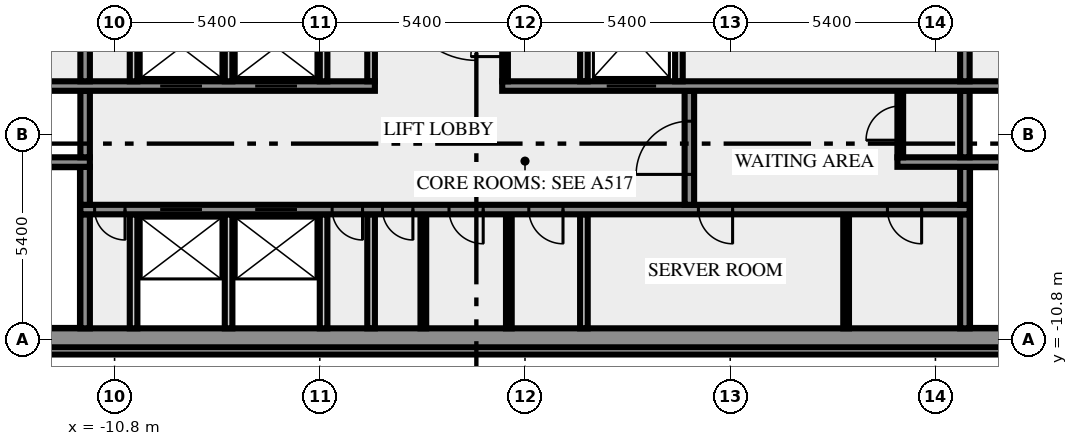
"""IFC4 building model, lengths in metres.
Left out: names, types, materials, properties, quantities, classifications, styles, units other than length and angle.
Written with IfcOpenShell. Run it as: python <this file> out.ifc"""

import sys

from ifc_helpers import new_model, si_unit, direction, frame, frame_2d, origin, place, context, subcontext, project, spatial, rectangle, extrude, element, fill, save


model = new_model("IFC4")
c1 = context("Model", 3, precision=1e-05, world=origin(), true_north=direction((0.0, 1.0)))
c2 = subcontext(c1, "Body", "Model", "MODEL_VIEW")
j1 = project(units=[si_unit("LENGTHUNIT", "METRE"), si_unit("PLANEANGLEUNIT", "RADIAN")], contexts=[c1])
p1 = place(None, origin())
s1 = spatial("IfcSite", under=j1, at=p1, CompositionType="ELEMENT")
p2 = place(p1, origin())
s2 = spatial("IfcBuilding", under=s1, at=p2, CompositionType="ELEMENT")
p3 = place(p2, frame((0.0, 0.0, 307.0)))
s3 = spatial("IfcBuildingStorey", under=s2, at=p3, CompositionType="ELEMENT", Elevation=307.0)
p4 = place(p3, frame((-17.444, -11.088, 0.0), z_axis=(0.0, 0.0, 1.0), x_axis=(1.0, 0.0, 0.0)))
e1 = element("IfcWall", 1, at=p4, inside=s3, PredefinedType="SOLIDWALL", context=c2, shape_type="SweptSolid", body=[
    extrude(rectangle(XDim=34.888, YDim=0.2, at=frame_2d((17.444, 0.0))), origin(), (0.0, 0.0, 1.0), 3.65),
])
p5 = place(p3, frame((-20.0, -10.75, 0.0), z_axis=(0.0, 0.0, 1.0), x_axis=(1.0, 0.0, 0.0)))
e2 = element("IfcWall", 2, at=p5, inside=s3, PredefinedType="SHEAR", context=c2, shape_type="SweptSolid", body=[
    extrude(rectangle(XDim=40.0, YDim=0.5, at=frame_2d((20.0, 0.0))), origin(), (0.0, 0.0, 1.0), 3.65),
])
p6 = place(p5, frame((0.8, 0.0, 1.0)))
e3 = element("IfcOpeningElement", 3, at=p6, cuts=e2, PredefinedType="OPENING", context=c2, shape_type="SweptSolid", body=[
    extrude(rectangle(XDim=1.2, YDim=1.2, at=frame_2d((0.6, 0.6))), frame((0.0, 0.26, 0.0), z_axis=(0.0, -1.0, 0.0), x_axis=(1.0, 0.0, 0.0)), (0.0, 0.0, 1.0), 0.52),
])
p7 = place(p5, frame((38.0, 0.0, 1.0)))
e4 = element("IfcOpeningElement", 4, at=p7, cuts=e2, PredefinedType="OPENING", context=c2, shape_type="SweptSolid", body=[
    extrude(rectangle(XDim=1.2, YDim=1.2, at=frame_2d((0.6, 0.6))), frame((0.0, 0.26, 0.0), z_axis=(0.0, -1.0, 0.0), x_axis=(1.0, 0.0, 0.0)), (0.0, 0.0, 1.0), 0.52),
])
p8 = place(p3, frame((-11.575, -10.5, 0.0), z_axis=(0.0, 0.0, 1.0), x_axis=(0.0, 1.0, 0.0)))
e5 = element("IfcWall", 5, at=p8, inside=s3, PredefinedType="SHEAR", context=c2, shape_type="SweptSolid", body=[
    extrude(rectangle(XDim=3.0, YDim=0.25, at=frame_2d((1.5, 0.0))), origin(), (0.0, 0.0, 1.0), 3.65),
])
for number, where, z_axis, x_axis in (
    (6, (-10.3, -10.5, 0.0), (0.0, 0.0, 1.0), (0.0, 1.0, 0.0)),
    (7, (-7.8, -10.5, 0.0), (0.0, 0.0, 1.0), (0.0, 1.0, 0.0)),
    (8, (-5.3, -10.5, 0.0), (0.0, 0.0, 1.0), (0.0, 1.0, 0.0)),
    (9, (-4.05, -10.5, 0.0), (0.0, 0.0, 1.0), (0.0, 1.0, 0.0)),
):
    element("IfcWall", number, at=place(p3, frame(where, z_axis=z_axis, x_axis=x_axis)), inside=s3, PredefinedType="SOLIDWALL", context=c2, shape_type="SweptSolid", body=[
        extrude(rectangle(XDim=3.0, YDim=0.2, at=frame_2d((1.5, 0.0))), origin(), (0.0, 0.0, 1.0), 3.65),
    ])
for number, where, z_axis, x_axis in (
    (10, (-2.675, -10.5, 0.0), (0.0, 0.0, 1.0), (0.0, 1.0, 0.0)),
    (11, (-0.425, -10.5, 0.0), (0.0, 0.0, 1.0), (0.0, 1.0, 0.0)),
):
    element("IfcWall", number, at=place(p3, frame(where, z_axis=z_axis, x_axis=x_axis)), inside=s3, PredefinedType="PARTITIONING", context=c2, shape_type="SweptSolid", body=[
        extrude(rectangle(XDim=3.0, YDim=0.15, at=frame_2d((1.5, 0.0))), origin(), (0.0, 0.0, 1.0), 3.65),
    ])
p9 = place(p3, frame((1.55, -10.5, 0.0), z_axis=(0.0, 0.0, 1.0), x_axis=(0.0, 1.0, 0.0)))
e12 = element("IfcWall", 12, at=p9, inside=s3, PredefinedType="SOLIDWALL", context=c2, shape_type="SweptSolid", body=[
    extrude(rectangle(XDim=3.0, YDim=0.2, at=frame_2d((1.5, 0.0))), origin(), (0.0, 0.0, 1.0), 3.65),
])
p10 = place(p3, frame((8.45, -10.5, 0.0), z_axis=(0.0, 0.0, 1.0), x_axis=(0.0, 1.0, 0.0)))
e13 = element("IfcWall", 13, at=p10, inside=s3, PredefinedType="PARTITIONING", context=c2, shape_type="SweptSolid", body=[
    extrude(rectangle(XDim=3.0, YDim=0.15, at=frame_2d((1.5, 0.0))), origin(), (0.0, 0.0, 1.0), 3.65),
])
p11 = place(p3, frame((11.575, -10.5, 0.0), z_axis=(0.0, 0.0, 1.0), x_axis=(0.0, 1.0, 0.0)))
e14 = element("IfcWall", 14, at=p11, inside=s3, PredefinedType="SHEAR", context=c2, shape_type="SweptSolid", body=[
    extrude(rectangle(XDim=3.0, YDim=0.25, at=frame_2d((1.5, 0.0))), origin(), (0.0, 0.0, 1.0), 3.65),
])
p12 = place(p3, frame((11.7, -7.375, 0.0), z_axis=(0.0, 0.0, 1.0), x_axis=(-1.0, 0.0, 0.0)))
e15 = element("IfcWall", 15, at=p12, inside=s3, PredefinedType="SHEAR", context=c2, shape_type="SweptSolid", body=[
    extrude(rectangle(XDim=23.4, YDim=0.25, at=frame_2d((11.7, 0.0))), origin(), (0.0, 0.0, 1.0), 3.65),
])
p13 = place(p12, frame((22.225, 0.0, 0.0)))
e16 = element("IfcOpeningElement", 16, at=p13, cuts=e15, PredefinedType="OPENING", context=c2, shape_type="SweptSolid", body=[
    extrude(rectangle(XDim=0.8, YDim=2.1, at=frame_2d((0.4, 1.05))), frame((0.0, 0.135, 0.0), z_axis=(0.0, -1.0, 0.0), x_axis=(1.0, 0.0, 0.0)), (0.0, 0.0, 1.0), 0.27),
])
p14 = place(p12, frame((20.2, 0.0, 0.0)))
e17 = element("IfcOpeningElement", 17, at=p14, cuts=e15, PredefinedType="OPENING", context=c2, shape_type="SweptSolid", body=[
    extrude(rectangle(XDim=1.1, YDim=2.1, at=frame_2d((0.55, 1.05))), frame((0.0, 0.135, 0.0), z_axis=(0.0, -1.0, 0.0), x_axis=(1.0, 0.0, 0.0)), (0.0, 0.0, 1.0), 0.27),
])
p15 = place(p12, frame((17.7, 0.0, 0.0)))
e18 = element("IfcOpeningElement", 18, at=p15, cuts=e15, PredefinedType="OPENING", context=c2, shape_type="SweptSolid", body=[
    extrude(rectangle(XDim=1.1, YDim=2.1, at=frame_2d((0.55, 1.05))), frame((0.0, 0.135, 0.0), z_axis=(0.0, -1.0, 0.0), x_axis=(1.0, 0.0, 0.0)), (0.0, 0.0, 1.0), 0.27),
])
p16 = place(p12, frame((15.975, 0.0, 0.0)))
e19 = element("IfcOpeningElement", 19, at=p16, cuts=e15, PredefinedType="OPENING", context=c2, shape_type="SweptSolid", body=[
    extrude(rectangle(XDim=0.8, YDim=2.1, at=frame_2d((0.4, 1.05))), frame((0.0, 0.135, 0.0), z_axis=(0.0, -1.0, 0.0), x_axis=(1.0, 0.0, 0.0)), (0.0, 0.0, 1.0), 0.27),
])
p17 = place(p12, frame((14.65, 0.0, 0.0)))
e20 = element("IfcOpeningElement", 20, at=p17, cuts=e15, PredefinedType="OPENING", context=c2, shape_type="SweptSolid", body=[
    extrude(rectangle(XDim=0.8, YDim=2.1, at=frame_2d((0.4, 1.05))), frame((0.0, 0.135, 0.0), z_axis=(0.0, -1.0, 0.0), x_axis=(1.0, 0.0, 0.0)), (0.0, 0.0, 1.0), 0.27),
])
p18 = place(p12, frame((12.8, 0.0, 0.0)))
e21 = element("IfcOpeningElement", 21, at=p18, cuts=e15, PredefinedType="OPENING", context=c2, shape_type="SweptSolid", body=[
    extrude(rectangle(XDim=0.9, YDim=2.1, at=frame_2d((0.45, 1.05))), frame((0.0, 0.135, 0.0), z_axis=(0.0, -1.0, 0.0), x_axis=(1.0, 0.0, 0.0)), (0.0, 0.0, 1.0), 0.27),
])
p19 = place(p12, frame((10.7, 0.0, 0.0)))
e22 = element("IfcOpeningElement", 22, at=p19, cuts=e15, PredefinedType="OPENING", context=c2, shape_type="SweptSolid", body=[
    extrude(rectangle(XDim=0.9, YDim=2.1, at=frame_2d((0.45, 1.05))), frame((0.0, 0.135, 0.0), z_axis=(0.0, -1.0, 0.0), x_axis=(1.0, 0.0, 0.0)), (0.0, 0.0, 1.0), 0.27),
])
p20 = place(p12, frame((6.237, 0.0, 0.0)))
e23 = element("IfcOpeningElement", 23, at=p20, cuts=e15, PredefinedType="OPENING", context=c2, shape_type="SweptSolid", body=[
    extrude(rectangle(XDim=0.9, YDim=2.1, at=frame_2d((0.45, 1.05))), frame((0.0, 0.135, 0.0), z_axis=(0.0, -1.0, 0.0), x_axis=(1.0, 0.0, 0.0)), (0.0, 0.0, 1.0), 0.27),
])
p21 = place(p12, frame((1.263, 0.0, 0.0)))
e24 = element("IfcOpeningElement", 24, at=p21, cuts=e15, PredefinedType="OPENING", context=c2, shape_type="SweptSolid", body=[
    extrude(rectangle(XDim=0.9, YDim=2.1, at=frame_2d((0.45, 1.05))), frame((0.0, 0.135, 0.0), z_axis=(0.0, -1.0, 0.0), x_axis=(1.0, 0.0, 0.0)), (0.0, 0.0, 1.0), 0.27),
])
p22 = place(p3, frame((-11.575, -7.25, 0.0), z_axis=(0.0, 0.0, 1.0), x_axis=(0.0, 1.0, 0.0)))
e25 = element("IfcWall", 25, at=p22, inside=s3, PredefinedType="SHEAR", context=c2, shape_type="SweptSolid", body=[
    extrude(rectangle(XDim=1.0, YDim=0.25, at=frame_2d((0.5, 0.0))), origin(), (0.0, 0.0, 1.0), 3.65),
])
p23 = place(p3, frame((4.325, -7.25, 0.0), z_axis=(0.0, 0.0, 1.0), x_axis=(0.0, 1.0, 0.0)))
e26 = element("IfcWall", 26, at=p23, inside=s3, PredefinedType="SHEAR", context=c2, shape_type="SweptSolid", body=[
    extrude(rectangle(XDim=3.0, YDim=0.25, at=frame_2d((1.5, 0.0))), origin(), (0.0, 0.0, 1.0), 3.65),
])
p24 = place(p23, frame((0.8, 0.0, 0.0)))
e27 = element("IfcOpeningElement", 27, at=p24, cuts=e26, PredefinedType="OPENING", context=c2, shape_type="SweptSolid", body=[
    extrude(rectangle(XDim=1.4, YDim=2.1, at=frame_2d((0.7, 1.05))), frame((0.0, 0.135, 0.0), z_axis=(0.0, -1.0, 0.0), x_axis=(1.0, 0.0, 0.0)), (0.0, 0.0, 1.0), 0.27),
])
p25 = place(p3, frame((11.575, -7.25, 0.0), z_axis=(0.0, 0.0, 1.0), x_axis=(0.0, 1.0, 0.0)))
e28 = element("IfcWall", 28, at=p25, inside=s3, PredefinedType="SHEAR", context=c2, shape_type="SweptSolid", body=[
    extrude(rectangle(XDim=1.0, YDim=0.25, at=frame_2d((0.5, 0.0))), origin(), (0.0, 0.0, 1.0), 3.65),
])
p26 = place(p3, frame((-11.45, -6.125, 0.0), z_axis=(0.0, 0.0, 1.0), x_axis=(-1.0, 0.0, 0.0)))
e29 = element("IfcWall", 29, at=p26, inside=s3, PredefinedType="SHEAR", context=c2, shape_type="SweptSolid", body=[
    extrude(rectangle(XDim=8.05, YDim=0.25, at=frame_2d((4.025, 0.0))), origin(), (0.0, 0.0, 1.0), 3.65),
])
p27 = place(p26, frame((6.2, 0.0, 0.0)))
e30 = element("IfcOpeningElement", 30, at=p27, cuts=e29, PredefinedType="OPENING", context=c2, shape_type="SweptSolid", body=[
    extrude(rectangle(XDim=1.8, YDim=2.1, at=frame_2d((0.9, 1.05))), frame((0.0, 0.135, 0.0), z_axis=(0.0, -1.0, 0.0), x_axis=(1.0, 0.0, 0.0)), (0.0, 0.0, 1.0), 0.27),
])
p28 = place(p3, frame((20.0, -6.125, 0.0), z_axis=(0.0, 0.0, 1.0), x_axis=(-1.0, 0.0, 0.0)))
e31 = element("IfcWall", 31, at=p28, inside=s3, PredefinedType="SHEAR", context=c2, shape_type="SweptSolid", body=[
    extrude(rectangle(XDim=10.2, YDim=0.25, at=frame_2d((5.1, 0.0))), origin(), (0.0, 0.0, 1.0), 3.65),
])
p29 = place(p28, frame((0.55, 0.0, 0.0)))
e32 = element("IfcOpeningElement", 32, at=p29, cuts=e31, PredefinedType="OPENING", context=c2, shape_type="SweptSolid", body=[
    extrude(rectangle(XDim=1.8, YDim=2.1, at=frame_2d((0.9, 1.05))), frame((0.0, 0.135, 0.0), z_axis=(0.0, -1.0, 0.0), x_axis=(1.0, 0.0, 0.0)), (0.0, 0.0, 1.0), 0.27),
])
p30 = place(p3, frame((-11.575, -6.0, 0.0), z_axis=(0.0, 0.0, 1.0), x_axis=(0.0, 1.0, 0.0)))
e33 = element("IfcWall", 33, at=p30, inside=s3, PredefinedType="SHEAR", context=c2, shape_type="SweptSolid", body=[
    extrude(rectangle(XDim=1.75, YDim=0.25, at=frame_2d((0.875, 0.0))), origin(), (0.0, 0.0, 1.0), 3.65),
])
p31 = place(p3, frame((9.875, -6.0, 0.0), z_axis=(0.0, 0.0, 1.0), x_axis=(0.0, 1.0, 0.0)))
e34 = element("IfcWall", 34, at=p31, inside=s3, PredefinedType="PARTITIONING", context=c2, shape_type="SweptSolid", body=[
    extrude(rectangle(XDim=1.75, YDim=0.15, at=frame_2d((0.875, 0.0))), origin(), (0.0, 0.0, 1.0), 3.65),
])
p32 = place(p31, frame((0.45, 0.0, 0.0)))
e35 = element("IfcOpeningElement", 35, at=p32, cuts=e34, PredefinedType="OPENING", context=c2, shape_type="SweptSolid", body=[
    extrude(rectangle(XDim=0.9, YDim=2.1, at=frame_2d((0.45, 1.05))), frame((0.0, 0.085, 0.0), z_axis=(0.0, -1.0, 0.0), x_axis=(1.0, 0.0, 0.0)), (0.0, 0.0, 1.0), 0.17),
])
p33 = place(p3, frame((11.575, -6.0, 0.0), z_axis=(0.0, 0.0, 1.0), x_axis=(0.0, 1.0, 0.0)))
e36 = element("IfcWall", 36, at=p33, inside=s3, PredefinedType="SHEAR", context=c2, shape_type="SweptSolid", body=[
    extrude(rectangle(XDim=1.75, YDim=0.25, at=frame_2d((0.875, 0.0))), origin(), (0.0, 0.0, 1.0), 3.65),
])
p34 = place(p3, frame((-14.35, -4.125, 0.0), z_axis=(0.0, 0.0, 1.0), x_axis=(1.0, 0.0, 0.0)))
e37 = element("IfcWall", 37, at=p34, inside=s3, PredefinedType="SHEAR", context=c2, shape_type="SweptSolid", body=[
    extrude(rectangle(XDim=10.4, YDim=0.25, at=frame_2d((5.2, 0.0))), origin(), (0.0, 0.0, 1.0), 3.65),
])
p35 = place(p34, frame((4.75, 0.0, 0.0)))
e38 = element("IfcOpeningElement", 38, at=p35, cuts=e37, PredefinedType="OPENING", context=c2, shape_type="SweptSolid", body=[
    extrude(rectangle(XDim=1.1, YDim=2.1, at=frame_2d((0.55, 1.05))), frame((0.0, 0.135, 0.0), z_axis=(0.0, -1.0, 0.0), x_axis=(1.0, 0.0, 0.0)), (0.0, 0.0, 1.0), 0.27),
])
p36 = place(p34, frame((7.25, 0.0, 0.0)))
e39 = element("IfcOpeningElement", 39, at=p36, cuts=e37, PredefinedType="OPENING", context=c2, shape_type="SweptSolid", body=[
    extrude(rectangle(XDim=1.1, YDim=2.1, at=frame_2d((0.55, 1.05))), frame((0.0, 0.135, 0.0), z_axis=(0.0, -1.0, 0.0), x_axis=(1.0, 0.0, 0.0)), (0.0, 0.0, 1.0), 0.27),
])
p37 = place(p3, frame((-0.6, -4.125, 0.0), z_axis=(0.0, 0.0, 1.0), x_axis=(1.0, 0.0, 0.0)))
e40 = element("IfcWall", 40, at=p37, inside=s3, PredefinedType="SHEAR", context=c2, shape_type="SweptSolid", body=[
    extrude(rectangle(XDim=14.95, YDim=0.25, at=frame_2d((7.475, 0.0))), origin(), (0.0, 0.0, 1.0), 3.65),
])
p38 = place(p37, frame((2.75, 0.0, 0.0)))
e41 = element("IfcOpeningElement", 41, at=p38, cuts=e40, PredefinedType="OPENING", context=c2, shape_type="SweptSolid", body=[
    extrude(rectangle(XDim=1.3, YDim=2.1, at=frame_2d((0.65, 1.05))), frame((0.0, 0.135, 0.0), z_axis=(0.0, -1.0, 0.0), x_axis=(1.0, 0.0, 0.0)), (0.0, 0.0, 1.0), 0.27),
])
p39 = place(p3, frame((-11.575, -4.0, 0.0), z_axis=(0.0, 0.0, 1.0), x_axis=(0.0, 1.0, 0.0)))
e42 = element("IfcWall", 42, at=p39, inside=s3, PredefinedType="SHEAR", context=c2, shape_type="SweptSolid", body=[
    extrude(rectangle(XDim=2.3, YDim=0.25, at=frame_2d((1.15, 0.0))), origin(), (0.0, 0.0, 1.0), 3.65),
])
for number, where, z_axis, x_axis in (
    (43, (-10.3, -4.0, 0.0), (0.0, 0.0, 1.0), (0.0, 1.0, 0.0)),
    (44, (-7.8, -4.0, 0.0), (0.0, 0.0, 1.0), (0.0, 1.0, 0.0)),
    (45, (-5.3, -4.0, 0.0), (0.0, 0.0, 1.0), (0.0, 1.0, 0.0)),
    (46, (-4.05, -4.0, 0.0), (0.0, 0.0, 1.0), (0.0, 1.0, 0.0)),
):
    element("IfcWall", number, at=place(p3, frame(where, z_axis=z_axis, x_axis=x_axis)), inside=s3, PredefinedType="SOLIDWALL", context=c2, shape_type="SweptSolid", body=[
        extrude(rectangle(XDim=2.3, YDim=0.2, at=frame_2d((1.15, 0.0))), origin(), (0.0, 0.0, 1.0), 3.65),
    ])
p40 = place(p3, frame((-0.525, -4.0, 0.0), z_axis=(0.0, 0.0, 1.0), x_axis=(0.0, 1.0, 0.0)))
e47 = element("IfcWall", 47, at=p40, inside=s3, PredefinedType="PARTITIONING", context=c2, shape_type="SweptSolid", body=[
    extrude(rectangle(XDim=2.3, YDim=0.15, at=frame_2d((1.15, 0.0))), origin(), (0.0, 0.0, 1.0), 3.65),
])
p41 = place(p40, frame((0.65, 0.0, 0.0)))
e48 = element("IfcOpeningElement", 48, at=p41, cuts=e47, PredefinedType="OPENING", context=c2, shape_type="SweptSolid", body=[
    extrude(rectangle(XDim=0.9, YDim=2.1, at=frame_2d((0.45, 1.05))), frame((0.0, 0.085, 0.0), z_axis=(0.0, -1.0, 0.0), x_axis=(1.0, 0.0, 0.0)), (0.0, 0.0, 1.0), 0.17),
])
for number, where, z_axis, x_axis in (
    (49, (1.55, -4.0, 0.0), (0.0, 0.0, 1.0), (0.0, 1.0, 0.0)),
    (50, (4.05, -4.0, 0.0), (0.0, 0.0, 1.0), (0.0, 1.0, 0.0)),
):
    element("IfcWall", number, at=place(p3, frame(where, z_axis=z_axis, x_axis=x_axis)), inside=s3, PredefinedType="SOLIDWALL", context=c2, shape_type="SweptSolid", body=[
        extrude(rectangle(XDim=2.3, YDim=0.2, at=frame_2d((1.15, 0.0))), origin(), (0.0, 0.0, 1.0), 3.65),
    ])
p42 = place(p3, frame((11.575, -4.0, 0.0), z_axis=(0.0, 0.0, 1.0), x_axis=(0.0, 1.0, 0.0)))
e51 = element("IfcWall", 51, at=p42, inside=s3, PredefinedType="SHEAR", context=c2, shape_type="SweptSolid", body=[
    extrude(rectangle(XDim=2.3, YDim=0.25, at=frame_2d((1.15, 0.0))), origin(), (0.0, 0.0, 1.0), 3.65),
])
p43 = place(p13, origin())
e52 = element("IfcDoor", 52, at=p43, inside=s3, OperationType="SINGLE_SWING_RIGHT", PredefinedType="DOOR", context=c2, shape_type="SweptSolid", body=[
    extrude(rectangle(XDim=0.8, YDim=2.1, at=frame_2d((0.4, 1.05))), frame((0.0, 0.025, 0.0), z_axis=(0.0, -1.0, 0.0), x_axis=(1.0, 0.0, 0.0)), (0.0, 0.0, 1.0), 0.05),
])
fill(e16, e52)
p44 = place(p14, origin())
e53 = element("IfcDoor", 53, at=p44, inside=s3, OperationType="DOUBLE_DOOR_SLIDING", PredefinedType="DOOR", context=c2, shape_type="SweptSolid", body=[
    extrude(rectangle(XDim=1.1, YDim=2.1, at=frame_2d((0.55, 1.05))), frame((0.0, 0.025, 0.0), z_axis=(0.0, -1.0, 0.0), x_axis=(1.0, 0.0, 0.0)), (0.0, 0.0, 1.0), 0.05),
])
fill(e17, e53)
p45 = place(p15, origin())
e54 = element("IfcDoor", 54, at=p45, inside=s3, OperationType="DOUBLE_DOOR_SLIDING", PredefinedType="DOOR", context=c2, shape_type="SweptSolid", body=[
    extrude(rectangle(XDim=1.1, YDim=2.1, at=frame_2d((0.55, 1.05))), frame((0.0, 0.025, 0.0), z_axis=(0.0, -1.0, 0.0), x_axis=(1.0, 0.0, 0.0)), (0.0, 0.0, 1.0), 0.05),
])
fill(e18, e54)
p46 = place(p16, origin())
e55 = element("IfcDoor", 55, at=p46, inside=s3, OperationType="SINGLE_SWING_RIGHT", PredefinedType="DOOR", context=c2, shape_type="SweptSolid", body=[
    extrude(rectangle(XDim=0.8, YDim=2.1, at=frame_2d((0.4, 1.05))), frame((0.0, 0.025, 0.0), z_axis=(0.0, -1.0, 0.0), x_axis=(1.0, 0.0, 0.0)), (0.0, 0.0, 1.0), 0.05),
])
fill(e19, e55)
p47 = place(p17, origin())
e56 = element("IfcDoor", 56, at=p47, inside=s3, OperationType="SINGLE_SWING_RIGHT", PredefinedType="DOOR", context=c2, shape_type="SweptSolid", body=[
    extrude(rectangle(XDim=0.8, YDim=2.1, at=frame_2d((0.4, 1.05))), frame((0.0, 0.025, 0.0), z_axis=(0.0, -1.0, 0.0), x_axis=(1.0, 0.0, 0.0)), (0.0, 0.0, 1.0), 0.05),
])
fill(e20, e56)
p48 = place(p18, origin())
e57 = element("IfcDoor", 57, at=p48, inside=s3, OperationType="SINGLE_SWING_RIGHT", PredefinedType="DOOR", context=c2, shape_type="SweptSolid", body=[
    extrude(rectangle(XDim=0.9, YDim=2.1, at=frame_2d((0.45, 1.05))), frame((0.0, 0.025, 0.0), z_axis=(0.0, -1.0, 0.0), x_axis=(1.0, 0.0, 0.0)), (0.0, 0.0, 1.0), 0.05),
])
fill(e21, e57)
p49 = place(p19, origin())
e58 = element("IfcDoor", 58, at=p49, inside=s3, OperationType="SINGLE_SWING_LEFT", PredefinedType="DOOR", context=c2, shape_type="SweptSolid", body=[
    extrude(rectangle(XDim=0.9, YDim=2.1, at=frame_2d((0.45, 1.05))), frame((0.0, 0.025, 0.0), z_axis=(0.0, -1.0, 0.0), x_axis=(1.0, 0.0, 0.0)), (0.0, 0.0, 1.0), 0.05),
])
fill(e22, e58)
p50 = place(p20, origin())
e59 = element("IfcDoor", 59, at=p50, inside=s3, OperationType="SINGLE_SWING_LEFT", PredefinedType="DOOR", context=c2, shape_type="SweptSolid", body=[
    extrude(rectangle(XDim=0.9, YDim=2.1, at=frame_2d((0.45, 1.05))), frame((0.0, 0.025, 0.0), z_axis=(0.0, -1.0, 0.0), x_axis=(1.0, 0.0, 0.0)), (0.0, 0.0, 1.0), 0.05),
])
fill(e23, e59)
p51 = place(p21, origin())
e60 = element("IfcDoor", 60, at=p51, inside=s3, OperationType="SINGLE_SWING_LEFT", PredefinedType="DOOR", context=c2, shape_type="SweptSolid", body=[
    extrude(rectangle(XDim=0.9, YDim=2.1, at=frame_2d((0.45, 1.05))), frame((0.0, 0.025, 0.0), z_axis=(0.0, -1.0, 0.0), x_axis=(1.0, 0.0, 0.0)), (0.0, 0.0, 1.0), 0.05),
])
fill(e24, e60)
p52 = place(p24, origin())
e61 = element("IfcDoor", 61, at=p52, inside=s3, OperationType="DOUBLE_DOOR_SINGLE_SWING", PredefinedType="DOOR", context=c2, shape_type="SweptSolid", body=[
    extrude(rectangle(XDim=1.4, YDim=2.1, at=frame_2d((0.7, 1.05))), frame((0.0, 0.025, 0.0), z_axis=(0.0, -1.0, 0.0), x_axis=(1.0, 0.0, 0.0)), (0.0, 0.0, 1.0), 0.05),
])
fill(e27, e61)
p53 = place(p32, origin())
e62 = element("IfcDoor", 62, at=p53, inside=s3, OperationType="SINGLE_SWING_RIGHT", PredefinedType="DOOR", context=c2, shape_type="SweptSolid", body=[
    extrude(rectangle(XDim=0.9, YDim=2.1, at=frame_2d((0.45, 1.05))), frame((0.0, 0.025, 0.0), z_axis=(0.0, -1.0, 0.0), x_axis=(1.0, 0.0, 0.0)), (0.0, 0.0, 1.0), 0.05),
])
fill(e35, e62)
p54 = place(p35, origin())
e63 = element("IfcDoor", 63, at=p54, inside=s3, OperationType="DOUBLE_DOOR_SLIDING", PredefinedType="DOOR", context=c2, shape_type="SweptSolid", body=[
    extrude(rectangle(XDim=1.1, YDim=2.1, at=frame_2d((0.55, 1.05))), frame((0.0, 0.025, 0.0), z_axis=(0.0, -1.0, 0.0), x_axis=(1.0, 0.0, 0.0)), (0.0, 0.0, 1.0), 0.05),
])
fill(e38, e63)
p55 = place(p36, origin())
e64 = element("IfcDoor", 64, at=p55, inside=s3, OperationType="DOUBLE_DOOR_SLIDING", PredefinedType="DOOR", context=c2, shape_type="SweptSolid", body=[
    extrude(rectangle(XDim=1.1, YDim=2.1, at=frame_2d((0.55, 1.05))), frame((0.0, 0.025, 0.0), z_axis=(0.0, -1.0, 0.0), x_axis=(1.0, 0.0, 0.0)), (0.0, 0.0, 1.0), 0.05),
])
fill(e39, e64)
p56 = place(p38, origin())
e65 = element("IfcDoor", 65, at=p56, inside=s3, OperationType="DOUBLE_DOOR_SLIDING", PredefinedType="DOOR", context=c2, shape_type="SweptSolid", body=[
    extrude(rectangle(XDim=1.3, YDim=2.1, at=frame_2d((0.65, 1.05))), frame((0.0, 0.025, 0.0), z_axis=(0.0, -1.0, 0.0), x_axis=(1.0, 0.0, 0.0)), (0.0, 0.0, 1.0), 0.05),
])
fill(e41, e65)
p57 = place(p41, origin())
e66 = element("IfcDoor", 66, at=p57, inside=s3, OperationType="SINGLE_SWING_LEFT", PredefinedType="DOOR", context=c2, shape_type="SweptSolid", body=[
    extrude(rectangle(XDim=0.9, YDim=2.1, at=frame_2d((0.45, 1.05))), frame((0.0, 0.025, 0.0), z_axis=(0.0, -1.0, 0.0), x_axis=(1.0, 0.0, 0.0)), (0.0, 0.0, 1.0), 0.05),
])
fill(e48, e66)
save(model, sys.argv[1])
